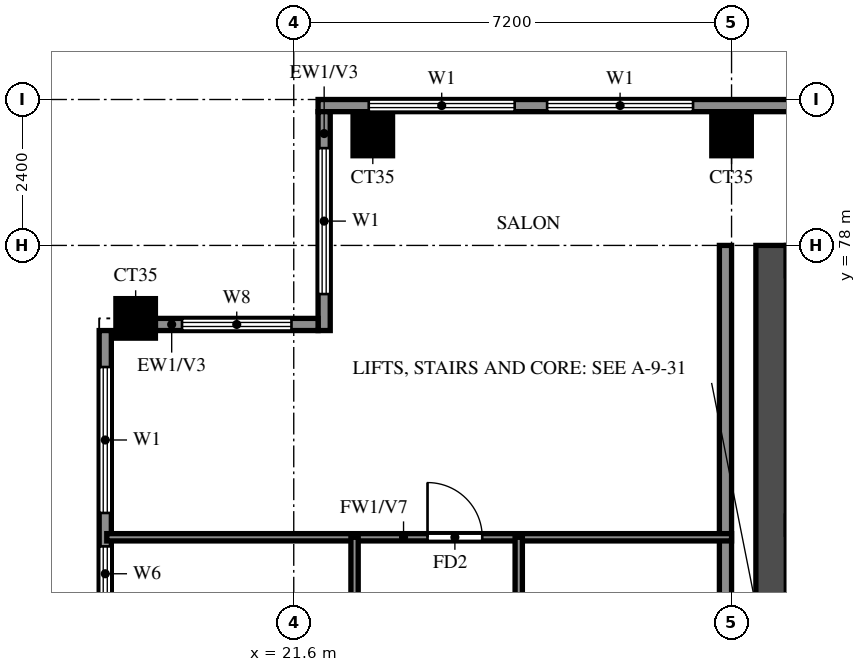
"""IFC4 building model, lengths in metres.
Left out: names, types, materials, properties, quantities, classifications, styles, units other than length and angle.
Written with IfcOpenShell. Run it as: python <this file> out.ifc"""

import sys

from ifc_helpers import new_model, si_unit, direction, frame, frame_2d, origin, origin_2d, place, context, subcontext, project, spatial, rectangle, extrude, source, transform, mapped, element, fill, save


model = new_model("IFC4")
c1 = context("Model", 3, precision=1e-05, world=origin(), true_north=direction((0.0, 1.0)))
c2 = subcontext(c1, "Body", "Model", "MODEL_VIEW")
j1 = project(units=[si_unit("LENGTHUNIT", "METRE"), si_unit("PLANEANGLEUNIT", "RADIAN")], contexts=[c1])
p1 = place(None, origin())
s1 = spatial("IfcSite", under=j1, at=p1, CompositionType="ELEMENT")
p2 = place(p1, origin())
s2 = spatial("IfcBuilding", under=s1, at=p2, CompositionType="ELEMENT")
p3 = place(p2, frame((0.0, 0.0, 243.0)))
s3 = spatial("IfcBuildingStorey", under=s2, at=p3, CompositionType="ELEMENT", Elevation=243.0)
m1 = source(origin(), c2, "Body", "SweptSolid", [
    extrude(rectangle(XDim=0.65, YDim=0.65, at=origin_2d()), origin(), (0.0, 0.0, 1.0), 3.22),
])
for number, where, z_axis, x_axis in (
    (1, (19.0, 76.8, 0.0), (0.0, 0.0, 1.0), (1.0, 0.0, 0.0)),
    (2, (22.9, 79.8, 0.0), (0.0, 0.0, 1.0), (1.0, 0.0, 0.0)),
    (3, (28.8, 79.8, 0.0), (0.0, 0.0, 1.0), (1.0, 0.0, 0.0)),
):
    element("IfcColumn", number, at=place(p3, frame(where, z_axis=z_axis, x_axis=x_axis)), inside=s3, PredefinedType="COLUMN", context=c2, shape_type="MappedRepresentation", body=[
        mapped(m1, transform((0.0, 0.0, 0.0))),
    ])
p4 = place(p3, frame((29.45, 66.15, 0.0), z_axis=(0.0, 0.0, 1.0), x_axis=(0.0, 1.0, 0.0)))
e4 = element("IfcWall", 4, at=p4, inside=s3, PredefinedType="SHEAR", context=c2, shape_type="SweptSolid", body=[
    extrude(rectangle(XDim=11.85, YDim=0.5, at=frame_2d((5.925, 0.0))), origin(), (0.0, 0.0, 1.0), 3.22),
])
p5 = place(p3, frame((78.6, 80.3, 0.0), z_axis=(0.0, 0.0, 1.0), x_axis=(-1.0, 0.0, 0.0)))
e5 = element("IfcWall", 5, at=p5, inside=s3, PredefinedType="SOLIDWALL", context=c2, shape_type="SweptSolid", body=[
    extrude(rectangle(XDim=56.6, YDim=0.2, at=frame_2d((28.3, 0.0))), origin(), (0.0, 0.0, 1.0), 3.22),
])
p6 = place(p5, frame((50.433, 0.0, 0.6)))
e6 = element("IfcOpeningElement", 6, at=p6, cuts=e5, PredefinedType="OPENING", context=c2, shape_type="SweptSolid", body=[
    extrude(rectangle(XDim=2.4, YDim=2.4, at=frame_2d((1.2, 1.2))), frame((0.0, 0.11, 0.0), z_axis=(0.0, -1.0, 0.0), x_axis=(1.0, 0.0, 0.0)), (0.0, 0.0, 1.0), 0.22),
])
p7 = place(p5, frame((53.367, 0.0, 0.6)))
e7 = element("IfcOpeningElement", 7, at=p7, cuts=e5, PredefinedType="OPENING", context=c2, shape_type="SweptSolid", body=[
    extrude(rectangle(XDim=2.4, YDim=2.4, at=frame_2d((1.2, 1.2))), frame((0.0, 0.11, 0.0), z_axis=(0.0, -1.0, 0.0), x_axis=(1.0, 0.0, 0.0)), (0.0, 0.0, 1.0), 0.22),
])
p8 = place(p5, frame((0.767, 0.0, 0.6)))
e8 = element("IfcOpeningElement", 8, at=p8, cuts=e5, PredefinedType="OPENING", context=c2, shape_type="SweptSolid", body=[
    extrude(rectangle(XDim=2.4, YDim=2.4, at=frame_2d((1.2, 1.2))), frame((0.0, 0.11, 0.0), z_axis=(0.0, -1.0, 0.0), x_axis=(1.0, 0.0, 0.0)), (0.0, 0.0, 1.0), 0.22),
])
p9 = place(p5, frame((3.633, 0.0, 0.6)))
e9 = element("IfcOpeningElement", 9, at=p9, cuts=e5, PredefinedType="OPENING", context=c2, shape_type="SweptSolid", body=[
    extrude(rectangle(XDim=2.4, YDim=2.4, at=frame_2d((1.2, 1.2))), frame((0.0, 0.11, 0.0), z_axis=(0.0, -1.0, 0.0), x_axis=(1.0, 0.0, 0.0)), (0.0, 0.0, 1.0), 0.22),
])
p10 = place(p3, frame((22.1, 80.2, 0.0), z_axis=(0.0, 0.0, 1.0), x_axis=(0.0, -1.0, 0.0)))
e10 = element("IfcWall", 10, at=p10, inside=s3, PredefinedType="SOLIDWALL", context=c2, shape_type="SweptSolid", body=[
    extrude(rectangle(XDim=3.6, YDim=0.2, at=frame_2d((1.8, 0.0))), origin(), (0.0, 0.0, 1.0), 3.22),
])
p11 = place(p10, frame((0.6, 0.0, 0.6)))
e11 = element("IfcOpeningElement", 11, at=p11, cuts=e10, PredefinedType="OPENING", context=c2, shape_type="SweptSolid", body=[
    extrude(rectangle(XDim=2.4, YDim=2.4, at=frame_2d((1.2, 1.2))), frame((0.0, 0.11, 0.0), z_axis=(0.0, -1.0, 0.0), x_axis=(1.0, 0.0, 0.0)), (0.0, 0.0, 1.0), 0.22),
])
p12 = place(p3, frame((22.0, 76.7, 0.0), z_axis=(0.0, 0.0, 1.0), x_axis=(-1.0, 0.0, 0.0)))
e12 = element("IfcWall", 12, at=p12, inside=s3, PredefinedType="SOLIDWALL", context=c2, shape_type="SweptSolid", body=[
    extrude(rectangle(XDim=2.675, YDim=0.2, at=frame_2d((1.337, 0.0))), origin(), (0.0, 0.0, 1.0), 3.22),
])
p13 = place(p12, frame((0.438, 0.0, 0.6)))
e13 = element("IfcOpeningElement", 13, at=p13, cuts=e12, PredefinedType="OPENING", context=c2, shape_type="SweptSolid", body=[
    extrude(rectangle(XDim=1.8, YDim=2.4, at=frame_2d((0.9, 1.2))), frame((0.0, 0.11, 0.0), z_axis=(0.0, -1.0, 0.0), x_axis=(1.0, 0.0, 0.0)), (0.0, 0.0, 1.0), 0.22),
])
p14 = place(p3, frame((18.5, 76.6, 0.0), z_axis=(0.0, 0.0, 1.0), x_axis=(0.0, -1.0, 0.0)))
e14 = element("IfcWall", 14, at=p14, inside=s3, PredefinedType="SOLIDWALL", context=c2, shape_type="SweptSolid", body=[
    extrude(rectangle(XDim=33.4, YDim=0.2, at=frame_2d((16.7, 0.0))), origin(), (0.0, 0.0, 1.0), 3.22),
])
p15 = place(p14, frame((7.9, 0.0, 0.0)))
e15 = element("IfcOpeningElement", 15, at=p15, cuts=e14, PredefinedType="OPENING", context=c2, shape_type="SweptSolid", body=[
    extrude(rectangle(XDim=1.8, YDim=2.4, at=frame_2d((0.9, 1.2))), frame((0.0, 0.11, 0.0), z_axis=(0.0, -1.0, 0.0), x_axis=(1.0, 0.0, 0.0)), (0.0, 0.0, 1.0), 0.22),
])
p16 = place(p14, frame((22.3, 0.0, 0.0)))
e16 = element("IfcOpeningElement", 16, at=p16, cuts=e14, PredefinedType="OPENING", context=c2, shape_type="SweptSolid", body=[
    extrude(rectangle(XDim=1.8, YDim=2.4, at=frame_2d((0.9, 1.2))), frame((0.0, 0.11, 0.0), z_axis=(0.0, -1.0, 0.0), x_axis=(1.0, 0.0, 0.0)), (0.0, 0.0, 1.0), 0.22),
])
p17 = place(p14, frame((29.7, 0.0, 0.6)))
e17 = element("IfcOpeningElement", 17, at=p17, cuts=e14, PredefinedType="OPENING", context=c2, shape_type="SweptSolid", body=[
    extrude(rectangle(XDim=2.4, YDim=2.4, at=frame_2d((1.2, 1.2))), frame((0.0, 0.11, 0.0), z_axis=(0.0, -1.0, 0.0), x_axis=(1.0, 0.0, 0.0)), (0.0, 0.0, 1.0), 0.22),
])
p18 = place(p14, frame((26.5, 0.0, 0.6)))
e18 = element("IfcOpeningElement", 18, at=p18, cuts=e14, PredefinedType="OPENING", context=c2, shape_type="SweptSolid", body=[
    extrude(rectangle(XDim=1.8, YDim=2.4, at=frame_2d((0.9, 1.2))), frame((0.0, 0.11, 0.0), z_axis=(0.0, -1.0, 0.0), x_axis=(1.0, 0.0, 0.0)), (0.0, 0.0, 1.0), 0.22),
])
p19 = place(p14, frame((17.95, 0.0, 0.6)))
e19 = element("IfcOpeningElement", 19, at=p19, cuts=e14, PredefinedType="OPENING", context=c2, shape_type="SweptSolid", body=[
    extrude(rectangle(XDim=0.9, YDim=2.4, at=frame_2d((0.45, 1.2))), frame((0.0, 0.11, 0.0), z_axis=(0.0, -1.0, 0.0), x_axis=(1.0, 0.0, 0.0)), (0.0, 0.0, 1.0), 0.22),
])
p20 = place(p14, frame((19.9, 0.0, 0.6)))
e20 = element("IfcOpeningElement", 20, at=p20, cuts=e14, PredefinedType="OPENING", context=c2, shape_type="SweptSolid", body=[
    extrude(rectangle(XDim=1.8, YDim=2.4, at=frame_2d((0.9, 1.2))), frame((0.0, 0.11, 0.0), z_axis=(0.0, -1.0, 0.0), x_axis=(1.0, 0.0, 0.0)), (0.0, 0.0, 1.0), 0.22),
])
p21 = place(p14, frame((14.8, 0.0, 0.6)))
e21 = element("IfcOpeningElement", 21, at=p21, cuts=e14, PredefinedType="OPENING", context=c2, shape_type="SweptSolid", body=[
    extrude(rectangle(XDim=2.4, YDim=2.4, at=frame_2d((1.2, 1.2))), frame((0.0, 0.11, 0.0), z_axis=(0.0, -1.0, 0.0), x_axis=(1.0, 0.0, 0.0)), (0.0, 0.0, 1.0), 0.22),
])
p22 = place(p14, frame((12.1, 0.0, 0.6)))
e22 = element("IfcOpeningElement", 22, at=p22, cuts=e14, PredefinedType="OPENING", context=c2, shape_type="SweptSolid", body=[
    extrude(rectangle(XDim=1.8, YDim=2.4, at=frame_2d((0.9, 1.2))), frame((0.0, 0.11, 0.0), z_axis=(0.0, -1.0, 0.0), x_axis=(1.0, 0.0, 0.0)), (0.0, 0.0, 1.0), 0.22),
])
p23 = place(p14, frame((3.55, 0.0, 1.5)))
e23 = element("IfcOpeningElement", 23, at=p23, cuts=e14, PredefinedType="OPENING", context=c2, shape_type="SweptSolid", body=[
    extrude(rectangle(XDim=0.9, YDim=0.9, at=frame_2d((0.45, 0.45))), frame((0.0, 0.11, 0.0), z_axis=(0.0, -1.0, 0.0), x_axis=(1.0, 0.0, 0.0)), (0.0, 0.0, 1.0), 0.22),
])
p24 = place(p14, frame((5.65, 0.0, 1.5)))
e24 = element("IfcOpeningElement", 24, at=p24, cuts=e14, PredefinedType="OPENING", context=c2, shape_type="SweptSolid", body=[
    extrude(rectangle(XDim=0.9, YDim=0.9, at=frame_2d((0.45, 0.45))), frame((0.0, 0.11, 0.0), z_axis=(0.0, -1.0, 0.0), x_axis=(1.0, 0.0, 0.0)), (0.0, 0.0, 1.0), 0.22),
])
p25 = place(p14, frame((0.6, 0.0, 0.6)))
e25 = element("IfcOpeningElement", 25, at=p25, cuts=e14, PredefinedType="OPENING", context=c2, shape_type="SweptSolid", body=[
    extrude(rectangle(XDim=2.4, YDim=2.4, at=frame_2d((1.2, 1.2))), frame((0.0, 0.11, 0.0), z_axis=(0.0, -1.0, 0.0), x_axis=(1.0, 0.0, 0.0)), (0.0, 0.0, 1.0), 0.22),
])
p26 = place(p3, frame((28.7, 62.4, 0.0), z_axis=(0.0, 0.0, 1.0), x_axis=(0.0, 1.0, 0.0)))
e26 = element("IfcWall", 26, at=p26, inside=s3, PredefinedType="SOLIDWALL", context=c2, shape_type="SweptSolid", body=[
    extrude(rectangle(XDim=15.6, YDim=0.2, at=frame_2d((7.8, 0.0))), origin(), (0.0, 0.0, 1.0), 3.22),
])
p27 = place(p3, frame((18.525, 73.2, 0.0), z_axis=(0.0, 0.0, 1.0), x_axis=(1.0, 0.0, 0.0)))
e27 = element("IfcWall", 27, at=p27, inside=s3, PredefinedType="PARTITIONING", context=c2, shape_type="SweptSolid", body=[
    extrude(rectangle(XDim=10.275, YDim=0.12, at=frame_2d((5.138, 0.0))), origin(), (0.0, 0.0, 1.0), 2.32),
])
p28 = place(p27, frame((5.275, 0.0, 0.0)))
e28 = element("IfcOpeningElement", 28, at=p28, cuts=e27, PredefinedType="OPENING", context=c2, shape_type="SweptSolid", body=[
    extrude(rectangle(XDim=0.9, YDim=2.1, at=frame_2d((0.45, 1.05))), frame((0.0, 0.07, 0.0), z_axis=(0.0, -1.0, 0.0), x_axis=(1.0, 0.0, 0.0)), (0.0, 0.0, 1.0), 0.14),
])
p29 = place(p3, frame((22.6, 69.6, 0.0), z_axis=(0.0, 0.0, 1.0), x_axis=(0.0, 1.0, 0.0)))
e29 = element("IfcWall", 29, at=p29, inside=s3, PredefinedType="PARTITIONING", context=c2, shape_type="SweptSolid", body=[
    extrude(rectangle(XDim=3.6, YDim=0.12, at=frame_2d((1.8, 0.0))), origin(), (0.0, 0.0, 1.0), 3.22),
])
p30 = place(p3, frame((25.3, 64.8, 0.0), z_axis=(0.0, 0.0, 1.0), x_axis=(0.0, 1.0, 0.0)))
e30 = element("IfcWall", 30, at=p30, inside=s3, PredefinedType="PARTITIONING", context=c2, shape_type="SweptSolid", body=[
    extrude(rectangle(XDim=8.4, YDim=0.12, at=frame_2d((4.2, 0.0))), origin(), (0.0, 0.0, 1.0), 3.22),
])
p31 = place(p30, frame((4.925, 0.0, 0.0)))
e31 = element("IfcOpeningElement", 31, at=p31, cuts=e30, PredefinedType="OPENING", context=c2, shape_type="SweptSolid", body=[
    extrude(rectangle(XDim=0.9, YDim=2.1, at=frame_2d((0.45, 1.05))), frame((0.0, 0.07, 0.0), z_axis=(0.0, -1.0, 0.0), x_axis=(1.0, 0.0, 0.0)), (0.0, 0.0, 1.0), 0.14),
])
p32 = place(p6, origin())
e32 = element("IfcWindow", 32, at=p32, inside=s3, PartitioningType="DOUBLE_PANEL_VERTICAL", PredefinedType="WINDOW", context=c2, shape_type="SweptSolid", body=[
    extrude(rectangle(XDim=2.4, YDim=2.4, at=frame_2d((1.2, 1.2))), frame((0.0, 0.03, 0.0), z_axis=(0.0, -1.0, 0.0), x_axis=(1.0, 0.0, 0.0)), (0.0, 0.0, 1.0), 0.06),
])
fill(e6, e32)
p33 = place(p7, origin())
e33 = element("IfcWindow", 33, at=p33, inside=s3, PartitioningType="DOUBLE_PANEL_VERTICAL", PredefinedType="WINDOW", context=c2, shape_type="SweptSolid", body=[
    extrude(rectangle(XDim=2.4, YDim=2.4, at=frame_2d((1.2, 1.2))), frame((0.0, 0.03, 0.0), z_axis=(0.0, -1.0, 0.0), x_axis=(1.0, 0.0, 0.0)), (0.0, 0.0, 1.0), 0.06),
])
fill(e7, e33)
p34 = place(p11, origin())
e34 = element("IfcWindow", 34, at=p34, inside=s3, PartitioningType="DOUBLE_PANEL_VERTICAL", PredefinedType="WINDOW", context=c2, shape_type="SweptSolid", body=[
    extrude(rectangle(XDim=2.4, YDim=2.4, at=frame_2d((1.2, 1.2))), frame((0.0, 0.03, 0.0), z_axis=(0.0, -1.0, 0.0), x_axis=(1.0, 0.0, 0.0)), (0.0, 0.0, 1.0), 0.06),
])
fill(e11, e34)
p35 = place(p13, origin())
e35 = element("IfcWindow", 35, at=p35, inside=s3, PartitioningType="DOUBLE_PANEL_VERTICAL", PredefinedType="WINDOW", context=c2, shape_type="SweptSolid", body=[
    extrude(rectangle(XDim=1.8, YDim=2.4, at=frame_2d((0.9, 1.2))), frame((0.0, 0.03, 0.0), z_axis=(0.0, -1.0, 0.0), x_axis=(1.0, 0.0, 0.0)), (0.0, 0.0, 1.0), 0.06),
])
fill(e13, e35)
p36 = place(p23, origin())
e36 = element("IfcWindow", 36, at=p36, inside=s3, PartitioningType="SINGLE_PANEL", PredefinedType="WINDOW", context=c2, shape_type="SweptSolid", body=[
    extrude(rectangle(XDim=0.9, YDim=0.9, at=frame_2d((0.45, 0.45))), frame((0.0, 0.03, 0.0), z_axis=(0.0, -1.0, 0.0), x_axis=(1.0, 0.0, 0.0)), (0.0, 0.0, 1.0), 0.06),
])
fill(e23, e36)
p37 = place(p25, origin())
e37 = element("IfcWindow", 37, at=p37, inside=s3, PartitioningType="DOUBLE_PANEL_VERTICAL", PredefinedType="WINDOW", context=c2, shape_type="SweptSolid", body=[
    extrude(rectangle(XDim=2.4, YDim=2.4, at=frame_2d((1.2, 1.2))), frame((0.0, 0.03, 0.0), z_axis=(0.0, -1.0, 0.0), x_axis=(1.0, 0.0, 0.0)), (0.0, 0.0, 1.0), 0.06),
])
fill(e25, e37)
p38 = place(p28, origin())
e38 = element("IfcDoor", 38, at=p38, inside=s3, OperationType="SINGLE_SWING_LEFT", PredefinedType="DOOR", context=c2, shape_type="SweptSolid", body=[
    extrude(rectangle(XDim=0.9, YDim=2.1, at=frame_2d((0.45, 1.05))), frame((0.0, 0.025, 0.0), z_axis=(0.0, -1.0, 0.0), x_axis=(1.0, 0.0, 0.0)), (0.0, 0.0, 1.0), 0.05),
])
fill(e28, e38)
save(model, sys.argv[1])
